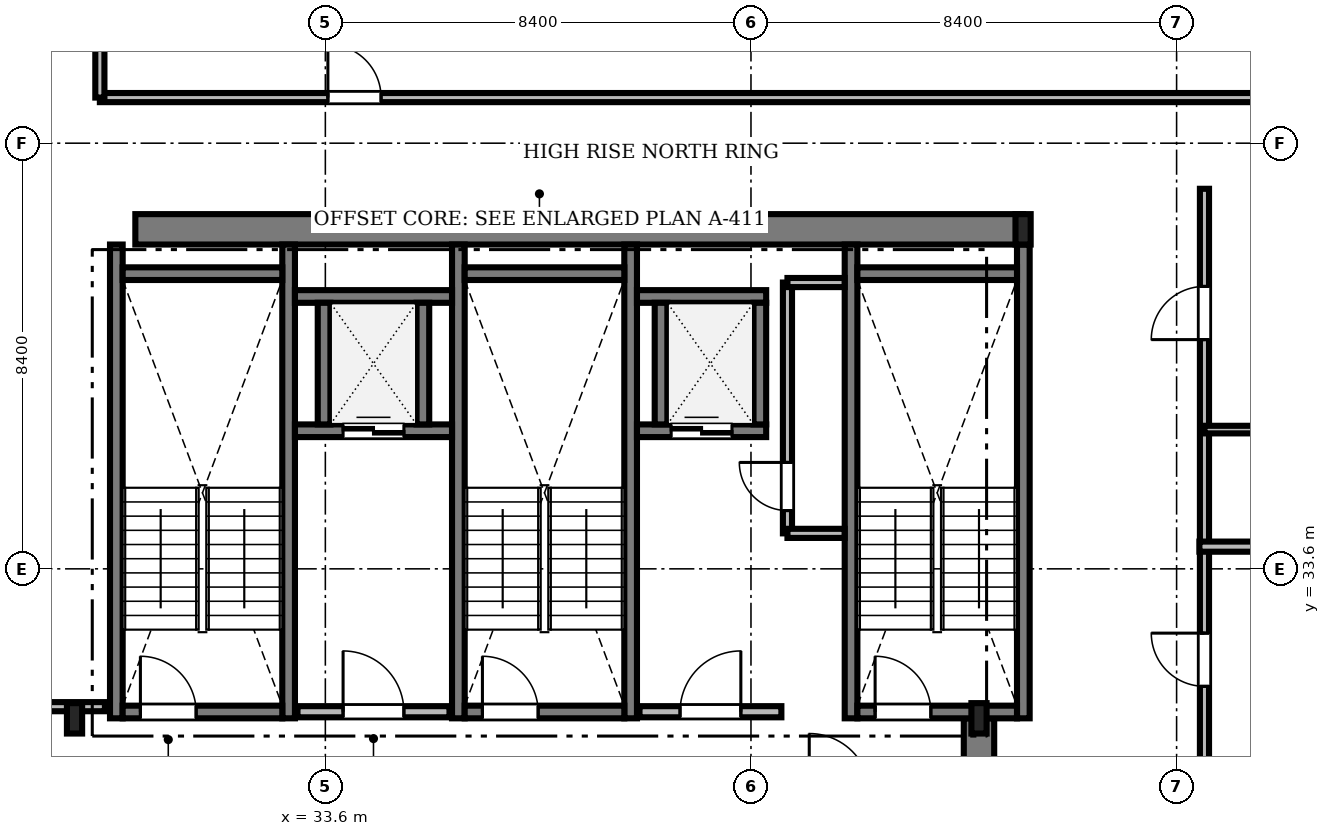
"""IFC4 building model, lengths in metres.
Left out: names, types, materials, properties, quantities, classifications, styles, units other than length and angle.
Written with IfcOpenShell. Run it as: python <this file> out.ifc"""

import sys

from ifc_helpers import new_model, si_unit, direction, frame, frame_2d, origin, origin_2d, place, context, subcontext, project, spatial, rectangle, i_section, extrude, source, transform, mapped, element, fill, save


model = new_model("IFC4")
c1 = context("Model", 3, precision=1e-05, world=origin(), true_north=direction((0.0, 1.0)))
c2 = subcontext(c1, "Body", "Model", "MODEL_VIEW")
j1 = project(units=[si_unit("LENGTHUNIT", "METRE"), si_unit("PLANEANGLEUNIT", "RADIAN")], contexts=[c1])
p1 = place(None, origin())
s1 = spatial("IfcSite", under=j1, at=p1, CompositionType="ELEMENT")
p2 = place(p1, origin())
s2 = spatial("IfcBuilding", under=s1, at=p2, CompositionType="ELEMENT")
p3 = place(p2, frame((0.0, 0.0, 250.6)))
s3 = spatial("IfcBuildingStorey", under=s2, at=p3, CompositionType="ELEMENT", Elevation=250.6)
m1 = source(origin(), c2, "Body", "SweptSolid", [
    extrude(rectangle(XDim=17.52, YDim=0.6, at=frame_2d((8.76, 0.0))), origin(), (0.0, 0.0, 1.0), 3.65),
])
p4 = place(p3, frame((29.85, 40.3, 0.0), z_axis=(0.0, 0.0, 1.0), x_axis=(1.0, 0.0, 0.0)))
e1 = element("IfcWall", 1, at=p4, inside=s3, PredefinedType="SHEAR", context=c2, shape_type="MappedRepresentation", body=[
    mapped(m1, transform((0.0, 0.0, 0.0), scale=1.0)),
])
m2 = source(origin(), c2, "Body", "SweptSolid", [
    extrude(rectangle(XDim=13.15, YDim=0.6, at=frame_2d((6.575, 0.0))), origin(), (0.0, 0.0, 1.0), 3.65),
])
p5 = place(p3, frame((46.5, 17.5, 0.0), z_axis=(0.0, 0.0, 1.0), x_axis=(0.0, 1.0, 0.0)))
e2 = element("IfcWall", 2, at=p5, inside=s3, PredefinedType="SHEAR", context=c2, shape_type="MappedRepresentation", body=[
    mapped(m2, transform((0.0, 0.0, 0.0), scale=1.0)),
])
m3 = source(origin(), c2, "Body", "SweptSolid", [
    extrude(i_section(OverallWidth=0.3, OverallDepth=0.6, WebThickness=0.015, FlangeThickness=0.03, FilletRadius=0.027, at=origin_2d()), origin(), (0.0, 0.0, 1.0), 3.65),
])
for number, where, z_axis, x_axis in (
    (3, (28.65, 30.65, 0.0), (0.0, 0.0, 1.0), (1.0, 0.0, 0.0)),
    (4, (46.5, 30.65, 0.0), (0.0, 0.0, 1.0), (1.0, 0.0, 0.0)),
    (5, (47.37, 40.3, 0.0), (0.0, 0.0, 1.0), (1.0, 0.0, 0.0)),
):
    element("IfcColumn", number, at=place(p3, frame(where, z_axis=z_axis, x_axis=x_axis)), inside=s3, PredefinedType="COLUMN", context=c2, shape_type="MappedRepresentation", body=[
        mapped(m3, transform((0.0, 0.0, 0.0), scale=1.0)),
    ])
m4 = source(origin(), c2, "Body", "SweptSolid", [
    extrude(rectangle(XDim=9.35, YDim=0.25, at=frame_2d((4.675, 0.0))), origin(), (0.0, 0.0, 1.0), 3.75),
])
for number, where, z_axis, x_axis in (
    (6, (29.475, 30.65, 0.0), (0.0, 0.0, 1.0), (0.0, 1.0, 0.0)),
    (7, (32.875, 30.65, 0.0), (0.0, 0.0, 1.0), (0.0, 1.0, 0.0)),
):
    element("IfcWall", number, at=place(p3, frame(where, z_axis=z_axis, x_axis=x_axis)), inside=s3, PredefinedType="SOLIDWALL", context=c2, shape_type="MappedRepresentation", body=[
        mapped(m4, transform((0.0, 0.0, 0.0), scale=1.0)),
    ])
m5 = source(origin(), c2, "Body", "SweptSolid", [
    extrude(rectangle(XDim=3.15, YDim=0.25, at=frame_2d((1.575, 0.0))), origin(), (0.0, 0.0, 1.0), 3.75),
])
p6 = place(p3, frame((29.6, 39.425, 0.0), z_axis=(0.0, 0.0, 1.0), x_axis=(1.0, 0.0, 0.0)))
e8 = element("IfcWall", 8, at=p6, inside=s3, PredefinedType="SOLIDWALL", context=c2, shape_type="MappedRepresentation", body=[
    mapped(m5, transform((0.0, 0.0, 0.0), scale=1.0)),
])
p7 = place(p3, frame((29.6, 30.775, 0.0), z_axis=(0.0, 0.0, 1.0), x_axis=(1.0, 0.0, 0.0)))
e9 = element("IfcWall", 9, at=p7, inside=s3, PredefinedType="SOLIDWALL", context=c2, shape_type="MappedRepresentation", body=[
    mapped(m5, transform((0.0, 0.0, 0.0), scale=1.0)),
])
m6 = source(origin(), c2, "Body", "SweptSolid", [
    extrude(rectangle(XDim=1.1, YDim=2.2, at=frame_2d((0.55, 1.1))), frame((0.0, 0.135, 0.0), z_axis=(0.0, -1.0, 0.0), x_axis=(1.0, 0.0, 0.0)), (0.0, 0.0, 1.0), 0.27),
])
p8 = place(p7, frame((0.35, 0.0, 0.0)))
e10 = element("IfcOpeningElement", 10, at=p8, cuts=e9, PredefinedType="OPENING", context=c2, shape_type="MappedRepresentation", body=[
    mapped(m6, transform((0.0, 0.0, 0.0), scale=1.0)),
])
for number, where, z_axis, x_axis in (
    (11, (36.225, 30.65, 0.0), (0.0, 0.0, 1.0), (0.0, 1.0, 0.0)),
    (12, (39.625, 30.65, 0.0), (0.0, 0.0, 1.0), (0.0, 1.0, 0.0)),
):
    element("IfcWall", number, at=place(p3, frame(where, z_axis=z_axis, x_axis=x_axis)), inside=s3, PredefinedType="SOLIDWALL", context=c2, shape_type="MappedRepresentation", body=[
        mapped(m4, transform((0.0, 0.0, 0.0), scale=1.0)),
    ])
p9 = place(p3, frame((36.35, 39.425, 0.0), z_axis=(0.0, 0.0, 1.0), x_axis=(1.0, 0.0, 0.0)))
e13 = element("IfcWall", 13, at=p9, inside=s3, PredefinedType="SOLIDWALL", context=c2, shape_type="MappedRepresentation", body=[
    mapped(m5, transform((0.0, 0.0, 0.0), scale=1.0)),
])
p10 = place(p3, frame((36.35, 30.775, 0.0), z_axis=(0.0, 0.0, 1.0), x_axis=(1.0, 0.0, 0.0)))
e14 = element("IfcWall", 14, at=p10, inside=s3, PredefinedType="SOLIDWALL", context=c2, shape_type="MappedRepresentation", body=[
    mapped(m5, transform((0.0, 0.0, 0.0), scale=1.0)),
])
p11 = place(p10, frame((0.35, 0.0, 0.0)))
e15 = element("IfcOpeningElement", 15, at=p11, cuts=e14, PredefinedType="OPENING", context=c2, shape_type="MappedRepresentation", body=[
    mapped(m6, transform((0.0, 0.0, 0.0), scale=1.0)),
])
for number, where, z_axis, x_axis in (
    (16, (43.975, 30.65, 0.0), (0.0, 0.0, 1.0), (0.0, 1.0, 0.0)),
    (17, (47.375, 30.65, 0.0), (0.0, 0.0, 1.0), (0.0, 1.0, 0.0)),
):
    element("IfcWall", number, at=place(p3, frame(where, z_axis=z_axis, x_axis=x_axis)), inside=s3, PredefinedType="SOLIDWALL", context=c2, shape_type="MappedRepresentation", body=[
        mapped(m4, transform((0.0, 0.0, 0.0), scale=1.0)),
    ])
p12 = place(p3, frame((44.1, 39.425, 0.0), z_axis=(0.0, 0.0, 1.0), x_axis=(1.0, 0.0, 0.0)))
e18 = element("IfcWall", 18, at=p12, inside=s3, PredefinedType="SOLIDWALL", context=c2, shape_type="MappedRepresentation", body=[
    mapped(m5, transform((0.0, 0.0, 0.0), scale=1.0)),
])
p13 = place(p3, frame((44.1, 30.775, 0.0), z_axis=(0.0, 0.0, 1.0), x_axis=(1.0, 0.0, 0.0)))
e19 = element("IfcWall", 19, at=p13, inside=s3, PredefinedType="SOLIDWALL", context=c2, shape_type="MappedRepresentation", body=[
    mapped(m5, transform((0.0, 0.0, 0.0), scale=1.0)),
])
p14 = place(p13, frame((0.35, 0.0, 0.0)))
e20 = element("IfcOpeningElement", 20, at=p14, cuts=e19, PredefinedType="OPENING", context=c2, shape_type="MappedRepresentation", body=[
    mapped(m6, transform((0.0, 0.0, 0.0), scale=1.0)),
])
m7 = source(origin(), c2, "Body", "SweptSolid", [
    extrude(rectangle(XDim=3.0, YDim=0.22, at=frame_2d((1.5, 0.0))), origin(), (0.0, 0.0, 1.0), 3.65),
])
p15 = place(p3, frame((33.05, 30.78, 0.0), z_axis=(0.0, 0.0, 1.0), x_axis=(1.0, 0.0, 0.0)))
e21 = element("IfcWall", 21, at=p15, inside=s3, PredefinedType="SOLIDWALL", context=c2, shape_type="MappedRepresentation", body=[
    mapped(m7, transform((0.0, 0.0, 0.0), scale=1.0)),
])
m8 = source(origin(), c2, "Body", "SweptSolid", [
    extrude(rectangle(XDim=1.2, YDim=2.2, at=frame_2d((0.6, 1.1))), frame((0.0, 0.12, 0.0), z_axis=(0.0, -1.0, 0.0), x_axis=(1.0, 0.0, 0.0)), (0.0, 0.0, 1.0), 0.24),
])
p16 = place(p15, frame((0.9, 0.0, 0.0)))
e22 = element("IfcOpeningElement", 22, at=p16, cuts=e21, PredefinedType="OPENING", context=c2, shape_type="MappedRepresentation", body=[
    mapped(m8, transform((0.0, 0.0, 0.0), scale=1.0)),
])
m9 = source(origin(), c2, "Body", "SweptSolid", [
    extrude(rectangle(XDim=2.8, YDim=0.22, at=frame_2d((1.4, 0.0))), origin(), (0.0, 0.0, 1.0), 3.65),
])
p17 = place(p3, frame((39.8, 30.78, 0.0), z_axis=(0.0, 0.0, 1.0), x_axis=(1.0, 0.0, 0.0)))
e23 = element("IfcWall", 23, at=p17, inside=s3, PredefinedType="SOLIDWALL", context=c2, shape_type="MappedRepresentation", body=[
    mapped(m9, transform((0.0, 0.0, 0.0), scale=1.0)),
])
p18 = place(p17, frame((0.8, 0.0, 0.0)))
e24 = element("IfcOpeningElement", 24, at=p18, cuts=e23, PredefinedType="OPENING", context=c2, shape_type="MappedRepresentation", body=[
    mapped(m8, transform((0.0, 0.0, 0.0), scale=1.0)),
])
m10 = source(origin(), c2, "Body", "SweptSolid", [
    extrude(rectangle(XDim=3.1, YDim=0.25, at=frame_2d((1.55, 0.0))), origin(), (0.0, 0.0, 1.0), 3.65),
])
p19 = place(p3, frame((33.0, 36.325, 0.0), z_axis=(0.0, 0.0, 1.0), x_axis=(1.0, 0.0, 0.0)))
e25 = element("IfcWall", 25, at=p19, inside=s3, PredefinedType="SOLIDWALL", context=c2, shape_type="MappedRepresentation", body=[
    mapped(m10, transform((0.0, 0.0, 0.0), scale=1.0)),
])
m11 = source(origin(), c2, "Body", "SweptSolid", [
    extrude(rectangle(XDim=1.2, YDim=2.25, at=frame_2d((0.6, 1.125))), frame((0.0, 0.135, 0.0), z_axis=(0.0, -1.0, 0.0), x_axis=(1.0, 0.0, 0.0)), (0.0, 0.0, 1.0), 0.27),
])
p20 = place(p19, frame((0.95, 0.0, 0.0)))
e26 = element("IfcOpeningElement", 26, at=p20, cuts=e25, PredefinedType="OPENING", context=c2, shape_type="MappedRepresentation", body=[
    mapped(m11, transform((0.0, 0.0, 0.0), scale=1.0)),
])
p21 = place(p3, frame((33.0, 38.975, 0.0), z_axis=(0.0, 0.0, 1.0), x_axis=(1.0, 0.0, 0.0)))
e27 = element("IfcWall", 27, at=p21, inside=s3, PredefinedType="SOLIDWALL", context=c2, shape_type="MappedRepresentation", body=[
    mapped(m10, transform((0.0, 0.0, 0.0), scale=1.0)),
])
m12 = source(origin(), c2, "Body", "SweptSolid", [
    extrude(rectangle(XDim=2.4, YDim=0.25, at=frame_2d((1.2, 0.0))), origin(), (0.0, 0.0, 1.0), 3.65),
])
for number, where, z_axis, x_axis in (
    (28, (33.575, 36.45, 0.0), (0.0, 0.0, 1.0), (0.0, 1.0, 0.0)),
    (29, (35.525, 36.45, 0.0), (0.0, 0.0, 1.0), (0.0, 1.0, 0.0)),
):
    element("IfcWall", number, at=place(p3, frame(where, z_axis=z_axis, x_axis=x_axis)), inside=s3, PredefinedType="SOLIDWALL", context=c2, shape_type="MappedRepresentation", body=[
        mapped(m12, transform((0.0, 0.0, 0.0), scale=1.0)),
    ])
m13 = source(origin(), c2, "Body", "SweptSolid", [
    extrude(rectangle(XDim=2.55, YDim=0.25, at=frame_2d((1.275, 0.0))), origin(), (0.0, 0.0, 1.0), 3.65),
])
p22 = place(p3, frame((39.75, 36.325, 0.0), z_axis=(0.0, 0.0, 1.0), x_axis=(1.0, 0.0, 0.0)))
e30 = element("IfcWall", 30, at=p22, inside=s3, PredefinedType="SOLIDWALL", context=c2, shape_type="MappedRepresentation", body=[
    mapped(m13, transform((0.0, 0.0, 0.0), scale=1.0)),
])
p23 = place(p22, frame((0.675, 0.0, 0.0)))
e31 = element("IfcOpeningElement", 31, at=p23, cuts=e30, PredefinedType="OPENING", context=c2, shape_type="MappedRepresentation", body=[
    mapped(m11, transform((0.0, 0.0, 0.0), scale=1.0)),
])
p24 = place(p3, frame((39.75, 38.975, 0.0), z_axis=(0.0, 0.0, 1.0), x_axis=(1.0, 0.0, 0.0)))
e32 = element("IfcWall", 32, at=p24, inside=s3, PredefinedType="SOLIDWALL", context=c2, shape_type="MappedRepresentation", body=[
    mapped(m13, transform((0.0, 0.0, 0.0), scale=1.0)),
])
for number, where, z_axis, x_axis in (
    (33, (40.225, 36.45, 0.0), (0.0, 0.0, 1.0), (0.0, 1.0, 0.0)),
    (34, (42.175, 36.45, 0.0), (0.0, 0.0, 1.0), (0.0, 1.0, 0.0)),
):
    element("IfcWall", number, at=place(p3, frame(where, z_axis=z_axis, x_axis=x_axis)), inside=s3, PredefinedType="SOLIDWALL", context=c2, shape_type="MappedRepresentation", body=[
        mapped(m12, transform((0.0, 0.0, 0.0), scale=1.0)),
    ])
m14 = source(origin(), c2, "Body", "SweptSolid", [
    extrude(rectangle(XDim=32.928, YDim=0.18, at=frame_2d((16.464, 0.0))), origin(), (0.0, 0.0, 1.0), 2.892),
])
p25 = place(p3, frame((29.15, 42.9, 0.0), z_axis=(0.0, 0.0, 1.0), x_axis=(1.0, 0.0, 0.0)))
e35 = element("IfcWall", 35, at=p25, inside=s3, PredefinedType="PARTITIONING", context=c2, shape_type="MappedRepresentation", body=[
    mapped(m14, transform((0.0, 0.0, 0.0), scale=1.0)),
])
m15 = source(origin(), c2, "Body", "SweptSolid", [
    extrude(rectangle(XDim=1.05, YDim=2.2, at=frame_2d((0.525, 1.1))), frame((0.0, 0.1, 0.0), z_axis=(0.0, -1.0, 0.0), x_axis=(1.0, 0.0, 0.0)), (0.0, 0.0, 1.0), 0.2),
])
p26 = place(p25, frame((4.5, 0.0, 0.0)))
e36 = element("IfcOpeningElement", 36, at=p26, cuts=e35, PredefinedType="OPENING", context=c2, shape_type="MappedRepresentation", body=[
    mapped(m15, transform((0.0, 0.0, 0.0), scale=1.0)),
])
m16 = source(origin(), c2, "Body", "SweptSolid", [
    extrude(rectangle(XDim=27.59, YDim=0.18, at=frame_2d((13.795, 0.0))), origin(), (0.0, 0.0, 1.0), 3.092),
])
p27 = place(p3, frame((50.95, 13.51, 0.0), z_axis=(0.0, 0.0, 1.0), x_axis=(0.0, 1.0, 0.0)))
e37 = element("IfcWall", 37, at=p27, inside=s3, PredefinedType="PARTITIONING", context=c2, shape_type="MappedRepresentation", body=[
    mapped(m16, transform((0.0, 0.0, 0.0), scale=1.0)),
])
p28 = place(p27, frame((4.086, 0.0, 0.0)))
e38 = element("IfcOpeningElement", 38, at=p28, cuts=e37, PredefinedType="OPENING", context=c2, shape_type="MappedRepresentation", body=[
    mapped(m15, transform((0.0, 0.0, 0.0), scale=1.0)),
])
p29 = place(p27, frame((9.744, 0.0, 0.0)))
e39 = element("IfcOpeningElement", 39, at=p29, cuts=e37, PredefinedType="OPENING", context=c2, shape_type="MappedRepresentation", body=[
    mapped(m15, transform((0.0, 0.0, 0.0), scale=1.0)),
])
p30 = place(p27, frame((17.771, 0.0, 0.0)))
e40 = element("IfcOpeningElement", 40, at=p30, cuts=e37, PredefinedType="OPENING", context=c2, shape_type="MappedRepresentation", body=[
    mapped(m15, transform((0.0, 0.0, 0.0), scale=1.0)),
])
p31 = place(p27, frame((24.614, 0.0, 0.0)))
e41 = element("IfcOpeningElement", 41, at=p31, cuts=e37, PredefinedType="OPENING", context=c2, shape_type="MappedRepresentation", body=[
    mapped(m15, transform((0.0, 0.0, 0.0), scale=1.0)),
])
m17 = source(origin(), c2, "Body", "SweptSolid", [
    extrude(rectangle(XDim=13.328, YDim=0.18, at=frame_2d((6.664, 0.0))), origin(), (0.0, 0.0, 1.0), 2.892),
])
p32 = place(p3, frame((15.922, 30.88, 0.0), z_axis=(0.0, 0.0, 1.0), x_axis=(1.0, 0.0, 0.0)))
e42 = element("IfcWall", 42, at=p32, inside=s3, PredefinedType="PARTITIONING", context=c2, shape_type="MappedRepresentation", body=[
    mapped(m17, transform((0.0, 0.0, 0.0), scale=1.0)),
])
p33 = place(p32, frame((6.278, 0.0, 0.0)))
e43 = element("IfcOpeningElement", 43, at=p33, cuts=e42, PredefinedType="OPENING", context=c2, shape_type="MappedRepresentation", body=[
    mapped(m15, transform((0.0, 0.0, 0.0), scale=1.0)),
])
m18 = source(origin(), c2, "Body", "SweptSolid", [
    extrude(rectangle(XDim=4.95, YDim=0.18, at=frame_2d((2.475, 0.0))), origin(), (0.0, 0.0, 1.0), 3.65),
])
p34 = place(p3, frame((42.72, 34.3, 0.0), z_axis=(0.0, 0.0, 1.0), x_axis=(0.0, 1.0, 0.0)))
e44 = element("IfcWall", 44, at=p34, inside=s3, PredefinedType="PARTITIONING", context=c2, shape_type="MappedRepresentation", body=[
    mapped(m18, transform((0.0, 0.0, 0.0), scale=1.0)),
])
m19 = source(origin(), c2, "Body", "SweptSolid", [
    extrude(rectangle(XDim=0.95, YDim=2.15, at=frame_2d((0.475, 1.075))), frame((0.0, 0.1, 0.0), z_axis=(0.0, -1.0, 0.0), x_axis=(1.0, 0.0, 0.0)), (0.0, 0.0, 1.0), 0.2),
])
p35 = place(p34, frame((0.45, 0.0, 0.0)))
e45 = element("IfcOpeningElement", 45, at=p35, cuts=e44, PredefinedType="OPENING", context=c2, shape_type="MappedRepresentation", body=[
    mapped(m19, transform((0.0, 0.0, 0.0), scale=1.0)),
])
m20 = source(origin(), c2, "Body", "SweptSolid", [
    extrude(rectangle(XDim=11.228, YDim=0.2, at=frame_2d((5.614, 0.0))), origin(), (0.0, 0.0, 1.0), 2.892),
])
p36 = place(p3, frame((50.85, 34.038, 0.0), z_axis=(0.0, 0.0, 1.0), x_axis=(1.0, 0.0, 0.0)))
e46 = element("IfcWall", 46, at=p36, inside=s3, PredefinedType="PARTITIONING", context=c2, shape_type="MappedRepresentation", body=[
    mapped(m20, transform((0.0, 0.0, 0.0), scale=1.0)),
])
m21 = source(origin(), c2, "Body", "SweptSolid", [
    extrude(rectangle(XDim=5.378, YDim=0.18, at=frame_2d((2.689, 0.0))), origin(), (0.0, 0.0, 1.0), 2.892),
])
p37 = place(p3, frame((29.15, 42.9, 0.0), z_axis=(0.0, 0.0, 1.0), x_axis=(0.0, 1.0, 0.0)))
e47 = element("IfcWall", 47, at=p37, inside=s3, PredefinedType="PARTITIONING", context=c2, shape_type="MappedRepresentation", body=[
    mapped(m21, transform((0.0, 0.0, 0.0), scale=1.0)),
])
m22 = source(origin(), c2, "Body", "SweptSolid", [
    extrude(rectangle(XDim=2.36, YDim=0.15, at=frame_2d((1.18, 0.0))), origin(), (0.0, 0.0, 1.0), 3.65),
])
p38 = place(p3, frame((50.95, 36.348, 0.0), z_axis=(0.0, 0.0, 1.0), x_axis=(1.0, 0.0, 0.0)))
e48 = element("IfcWall", 48, at=p38, inside=s3, PredefinedType="PARTITIONING", context=c2, shape_type="MappedRepresentation", body=[
    mapped(m22, transform((0.0, 0.0, 0.0), scale=1.0)),
])
m23 = source(origin(), c2, "Body", "SweptSolid", [
    extrude(rectangle(XDim=1.128, YDim=0.18, at=frame_2d((0.564, 0.0))), origin(), (0.0, 0.0, 1.0), 3.65),
])
for number, where, z_axis, x_axis in (
    (49, (42.72, 34.3, 0.0), (0.0, 0.0, 1.0), (1.0, 0.0, 0.0)),
    (50, (42.72, 39.25, 0.0), (0.0, 0.0, 1.0), (1.0, 0.0, 0.0)),
):
    element("IfcWall", number, at=place(p3, frame(where, z_axis=z_axis, x_axis=x_axis)), inside=s3, PredefinedType="PARTITIONING", context=c2, shape_type="MappedRepresentation", body=[
        mapped(m23, transform((0.0, 0.0, 0.0), scale=1.0)),
    ])
m24 = source(origin(), c2, "Body", "SweptSolid", [
    extrude(rectangle(XDim=1.1, YDim=2.2, at=frame_2d((0.55, 1.1))), frame((0.0, 0.025, 0.0), z_axis=(0.0, -1.0, 0.0), x_axis=(1.0, 0.0, 0.0)), (0.0, 0.0, 1.0), 0.05),
])
p39 = place(p8, origin())
e51 = element("IfcDoor", 51, at=p39, inside=s3, OperationType="SINGLE_SWING_LEFT", PredefinedType="DOOR", context=c2, shape_type="MappedRepresentation", body=[
    mapped(m24, transform((0.0, 0.0, 0.0), scale=1.0)),
])
fill(e10, e51)
p40 = place(p11, origin())
e52 = element("IfcDoor", 52, at=p40, inside=s3, OperationType="SINGLE_SWING_LEFT", PredefinedType="DOOR", context=c2, shape_type="MappedRepresentation", body=[
    mapped(m24, transform((0.0, 0.0, 0.0), scale=1.0)),
])
fill(e15, e52)
p41 = place(p14, origin())
e53 = element("IfcDoor", 53, at=p41, inside=s3, OperationType="SINGLE_SWING_LEFT", PredefinedType="DOOR", context=c2, shape_type="MappedRepresentation", body=[
    mapped(m24, transform((0.0, 0.0, 0.0), scale=1.0)),
])
fill(e20, e53)
m25 = source(origin(), c2, "Body", "SweptSolid", [
    extrude(rectangle(XDim=1.2, YDim=2.2, at=frame_2d((0.6, 1.1))), frame((0.0, 0.025, 0.0), z_axis=(0.0, -1.0, 0.0), x_axis=(1.0, 0.0, 0.0)), (0.0, 0.0, 1.0), 0.05),
])
p42 = place(p16, origin())
e54 = element("IfcDoor", 54, at=p42, inside=s3, OperationType="SINGLE_SWING_LEFT", PredefinedType="DOOR", context=c2, shape_type="MappedRepresentation", body=[
    mapped(m25, transform((0.0, 0.0, 0.0), scale=1.0)),
])
fill(e22, e54)
p43 = place(p18, origin())
e55 = element("IfcDoor", 55, at=p43, inside=s3, OperationType="SINGLE_SWING_RIGHT", PredefinedType="DOOR", context=c2, shape_type="MappedRepresentation", body=[
    mapped(m25, transform((0.0, 0.0, 0.0), scale=1.0)),
])
fill(e24, e55)
m26 = source(origin(), c2, "Body", "SweptSolid", [
    extrude(rectangle(XDim=1.2, YDim=2.25, at=frame_2d((0.6, 1.125))), frame((0.0, 0.025, 0.0), z_axis=(0.0, -1.0, 0.0), x_axis=(1.0, 0.0, 0.0)), (0.0, 0.0, 1.0), 0.05),
])
p44 = place(p20, origin())
e56 = element("IfcDoor", 56, at=p44, inside=s3, OperationType="DOUBLE_DOOR_SLIDING", PredefinedType="DOOR", context=c2, shape_type="MappedRepresentation", body=[
    mapped(m26, transform((0.0, 0.0, 0.0), scale=1.0)),
])
fill(e26, e56)
p45 = place(p23, origin())
e57 = element("IfcDoor", 57, at=p45, inside=s3, OperationType="DOUBLE_DOOR_SLIDING", PredefinedType="DOOR", context=c2, shape_type="MappedRepresentation", body=[
    mapped(m26, transform((0.0, 0.0, 0.0), scale=1.0)),
])
fill(e31, e57)
m27 = source(origin(), c2, "Body", "SweptSolid", [
    extrude(rectangle(XDim=1.05, YDim=2.2, at=frame_2d((0.525, 1.1))), frame((0.0, 0.025, 0.0), z_axis=(0.0, -1.0, 0.0), x_axis=(1.0, 0.0, 0.0)), (0.0, 0.0, 1.0), 0.05),
])
p46 = place(p26, origin())
e58 = element("IfcDoor", 58, at=p46, inside=s3, OperationType="SINGLE_SWING_LEFT", PredefinedType="DOOR", context=c2, shape_type="MappedRepresentation", body=[
    mapped(m27, transform((0.0, 0.0, 0.0), scale=1.0)),
])
fill(e36, e58)
p47 = place(p30, origin())
e59 = element("IfcDoor", 59, at=p47, inside=s3, OperationType="SINGLE_SWING_RIGHT", PredefinedType="DOOR", context=c2, shape_type="MappedRepresentation", body=[
    mapped(m27, transform((0.0, 0.0, 0.0), scale=1.0)),
])
fill(e40, e59)
p48 = place(p31, origin())
e60 = element("IfcDoor", 60, at=p48, inside=s3, OperationType="SINGLE_SWING_LEFT", PredefinedType="DOOR", context=c2, shape_type="MappedRepresentation", body=[
    mapped(m27, transform((0.0, 0.0, 0.0), scale=1.0)),
])
fill(e41, e60)
m28 = source(origin(), c2, "Body", "SweptSolid", [
    extrude(rectangle(XDim=0.95, YDim=2.15, at=frame_2d((0.475, 1.075))), frame((0.0, 0.025, 0.0), z_axis=(0.0, -1.0, 0.0), x_axis=(1.0, 0.0, 0.0)), (0.0, 0.0, 1.0), 0.05),
])
p49 = place(p35, origin())
e61 = element("IfcDoor", 61, at=p49, inside=s3, OperationType="SINGLE_SWING_RIGHT", PredefinedType="DOOR", context=c2, shape_type="MappedRepresentation", body=[
    mapped(m28, transform((0.0, 0.0, 0.0), scale=1.0)),
])
fill(e45, e61)
save(model, sys.argv[1])
